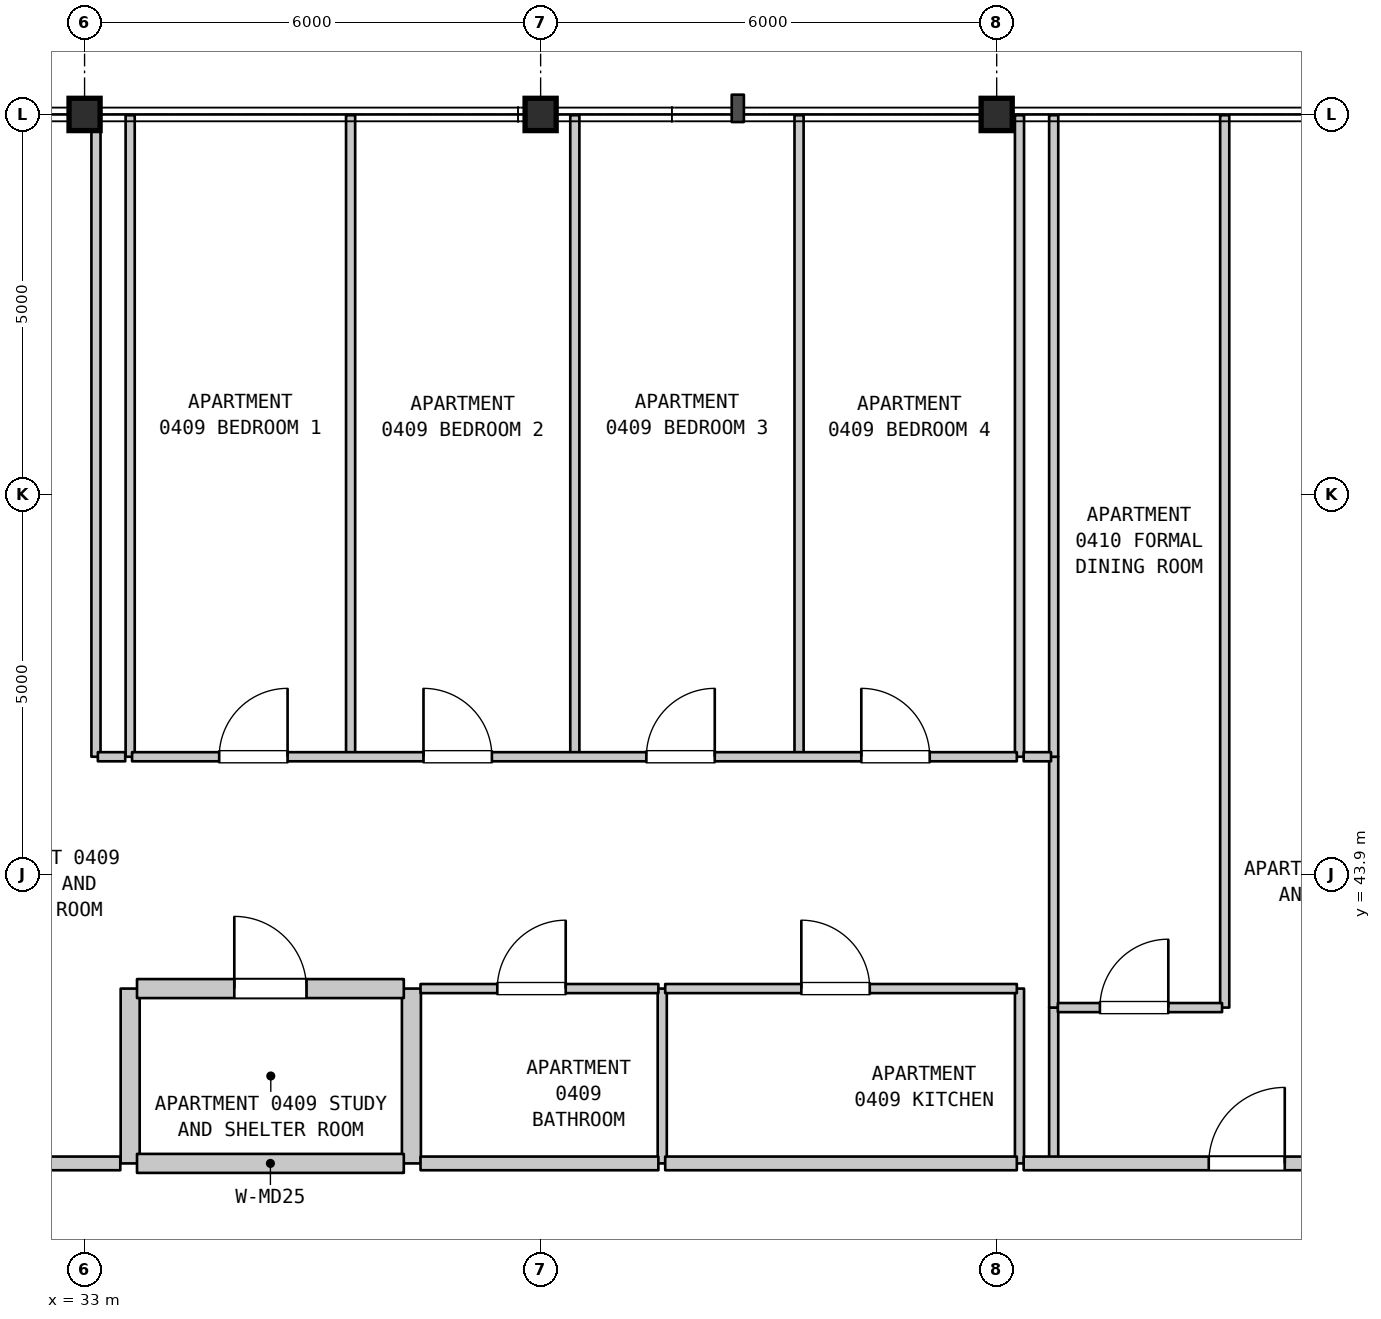
"""IFC4 building model, lengths in metres.
Left out: names, types, materials, properties, quantities, classifications, styles, units other than length and angle.
Written with IfcOpenShell. Run it as: python <this file> out.ifc"""

import sys

from ifc_helpers import new_model, si_unit, direction, frame, frame_2d, origin, origin_2d, place, context, subcontext, project, spatial, rectangle, i_section, extrude, element, fill, save


model = new_model("IFC4")
c1 = context("Model", 3, precision=1e-05, world=origin(), true_north=direction((0.0, 1.0)))
c2 = subcontext(c1, "Body", "Model", "MODEL_VIEW")
j1 = project(units=[si_unit("LENGTHUNIT", "METRE"), si_unit("PLANEANGLEUNIT", "RADIAN")], contexts=[c1])
p1 = place(None, origin())
s1 = spatial("IfcSite", under=j1, at=p1, CompositionType="ELEMENT")
p2 = place(p1, origin())
s2 = spatial("IfcBuilding", under=s1, at=p2, CompositionType="ELEMENT")
p3 = place(p2, frame((0.0, 0.0, 24.0)))
s3 = spatial("IfcBuildingStorey", under=s2, at=p3, CompositionType="ELEMENT", Elevation=24.0)
for number, where, z_axis, x_axis in (
    (1, (33.0, 53.9, 0.0), (0.0, 0.0, 1.0), (1.0, 0.0, 0.0)),
    (2, (39.0, 53.9, 0.0), (0.0, 0.0, 1.0), (1.0, 0.0, 0.0)),
    (3, (45.0, 53.9, 0.0), (0.0, 0.0, 1.0), (1.0, 0.0, 0.0)),
):
    element("IfcColumn", number, at=place(p3, frame(where, z_axis=z_axis, x_axis=x_axis)), inside=s3, PredefinedType="COLUMN", context=c2, shape_type="SweptSolid", body=[
        extrude(i_section(OverallWidth=0.409, OverallDepth=0.425, WebThickness=0.032, FlangeThickness=0.052, FilletRadius=0.015, at=origin_2d()), origin(), (0.0, 0.0, 1.0), 3.7),
    ])
p4 = place(p3, frame((33.15, 45.45, 0.0), z_axis=(0.0, 0.0, 1.0), x_axis=(0.0, 1.0, 0.0)))
e4 = element("IfcWall", 4, at=p4, inside=s3, PredefinedType="PARTITIONING", context=c2, shape_type="SweptSolid", body=[
    extrude(rectangle(XDim=8.44, YDim=0.12, at=frame_2d((4.22, 0.0))), origin(), (0.0, 0.0, 1.0), 2.785),
])
p5 = place(p3, frame((33.6, 40.1, 0.0), z_axis=(0.0, 0.0, 1.0), x_axis=(0.0, 1.0, 0.0)))
e5 = element("IfcWall", 5, at=p5, inside=s3, PredefinedType="STANDARD", context=c2, shape_type="SweptSolid", body=[
    extrude(rectangle(XDim=2.3, YDim=0.25, at=frame_2d((1.15, 0.0))), origin(), (0.0, 0.0, 1.0), 3.385),
])
for number, where, z_axis, x_axis in (
    (6, (33.6, 45.45, 0.0), (0.0, 0.0, 1.0), (0.0, 1.0, 0.0)),
    (7, (36.5, 45.45, 0.0), (0.0, 0.0, 1.0), (0.0, 1.0, 0.0)),
):
    element("IfcWall", number, at=place(p3, frame(where, z_axis=z_axis, x_axis=x_axis)), inside=s3, PredefinedType="PARTITIONING", context=c2, shape_type="SweptSolid", body=[
        extrude(rectangle(XDim=8.44, YDim=0.12, at=frame_2d((4.22, 0.0))), origin(), (0.0, 0.0, 1.0), 3.385),
    ])
p6 = place(p3, frame((37.3, 40.1, 0.0), z_axis=(0.0, 0.0, 1.0), x_axis=(0.0, 1.0, 0.0)))
e8 = element("IfcWall", 8, at=p6, inside=s3, PredefinedType="STANDARD", context=c2, shape_type="SweptSolid", body=[
    extrude(rectangle(XDim=2.3, YDim=0.25, at=frame_2d((1.15, 0.0))), origin(), (0.0, 0.0, 1.0), 3.385),
])
p7 = place(p3, frame((39.45, 45.45, 0.0), z_axis=(0.0, 0.0, 1.0), x_axis=(0.0, 1.0, 0.0)))
e9 = element("IfcWall", 9, at=p7, inside=s3, PredefinedType="PARTITIONING", context=c2, shape_type="SweptSolid", body=[
    extrude(rectangle(XDim=8.44, YDim=0.12, at=frame_2d((4.22, 0.0))), origin(), (0.0, 0.0, 1.0), 3.385),
])
p8 = place(p3, frame((40.6, 40.1, 0.0), z_axis=(0.0, 0.0, 1.0), x_axis=(0.0, 1.0, 0.0)))
e10 = element("IfcWall", 10, at=p8, inside=s3, PredefinedType="PARTITIONING", context=c2, shape_type="SweptSolid", body=[
    extrude(rectangle(XDim=2.3, YDim=0.12, at=frame_2d((1.15, 0.0))), origin(), (0.0, 0.0, 1.0), 3.385),
])
p9 = place(p3, frame((42.4, 45.45, 0.0), z_axis=(0.0, 0.0, 1.0), x_axis=(0.0, 1.0, 0.0)))
e11 = element("IfcWall", 11, at=p9, inside=s3, PredefinedType="PARTITIONING", context=c2, shape_type="SweptSolid", body=[
    extrude(rectangle(XDim=8.44, YDim=0.12, at=frame_2d((4.22, 0.0))), origin(), (0.0, 0.0, 1.0), 3.385),
])
p10 = place(p3, frame((45.3, 40.1, 0.0), z_axis=(0.0, 0.0, 1.0), x_axis=(0.0, 1.0, 0.0)))
e12 = element("IfcWall", 12, at=p10, inside=s3, PredefinedType="PARTITIONING", context=c2, shape_type="SweptSolid", body=[
    extrude(rectangle(XDim=2.3, YDim=0.12, at=frame_2d((1.15, 0.0))), origin(), (0.0, 0.0, 1.0), 3.385),
])
p11 = place(p3, frame((45.3, 45.45, 0.0), z_axis=(0.0, 0.0, 1.0), x_axis=(0.0, 1.0, 0.0)))
e13 = element("IfcWall", 13, at=p11, inside=s3, PredefinedType="PARTITIONING", context=c2, shape_type="SweptSolid", body=[
    extrude(rectangle(XDim=8.44, YDim=0.12, at=frame_2d((4.22, 0.0))), origin(), (0.0, 0.0, 1.0), 3.385),
])
p12 = place(p3, frame((45.75, 40.1, 0.0), z_axis=(0.0, 0.0, 1.0), x_axis=(0.0, 1.0, 0.0)))
e14 = element("IfcWall", 14, at=p12, inside=s3, PredefinedType="PARTITIONING", context=c2, shape_type="SweptSolid", body=[
    extrude(rectangle(XDim=2.05, YDim=0.12, at=frame_2d((1.025, 0.0))), origin(), (0.0, 0.0, 1.0), 3.385),
])
p13 = place(p3, frame((45.75, 42.15, 0.0), z_axis=(0.0, 0.0, 1.0), x_axis=(0.0, 1.0, 0.0)))
e15 = element("IfcWall", 15, at=p13, inside=s3, PredefinedType="PARTITIONING", context=c2, shape_type="SweptSolid", body=[
    extrude(rectangle(XDim=3.3, YDim=0.12, at=frame_2d((1.65, 0.0))), origin(), (0.0, 0.0, 1.0), 3.385),
])
p14 = place(p3, frame((45.75, 45.45, 0.0), z_axis=(0.0, 0.0, 1.0), x_axis=(0.0, 1.0, 0.0)))
e16 = element("IfcWall", 16, at=p14, inside=s3, PredefinedType="PARTITIONING", context=c2, shape_type="SweptSolid", body=[
    extrude(rectangle(XDim=8.44, YDim=0.12, at=frame_2d((4.22, 0.0))), origin(), (0.0, 0.0, 1.0), 3.385),
])
p15 = place(p3, frame((48.0, 42.15, 0.0), z_axis=(0.0, 0.0, 1.0), x_axis=(0.0, 1.0, 0.0)))
e17 = element("IfcWall", 17, at=p15, inside=s3, PredefinedType="PARTITIONING", context=c2, shape_type="SweptSolid", body=[
    extrude(rectangle(XDim=11.74, YDim=0.12, at=frame_2d((5.87, 0.0))), origin(), (0.0, 0.0, 1.0), 3.385),
])
p16 = place(p3, frame((28.375, 40.1, 0.0), z_axis=(0.0, 0.0, 1.0), x_axis=(1.0, 0.0, 0.0)))
e18 = element("IfcWall", 18, at=p16, inside=s3, PredefinedType="STANDARD", context=c2, shape_type="SweptSolid", body=[
    extrude(rectangle(XDim=5.095, YDim=0.18, at=frame_2d((2.547, 0.0))), origin(), (0.0, 0.0, 1.0), 3.385),
])
p17 = place(p16, frame((2.08, 0.0, 0.0)))
e19 = element("IfcOpeningElement", 19, at=p17, cuts=e18, PredefinedType="OPENING", context=c2, shape_type="SweptSolid", body=[
    extrude(rectangle(XDim=1.0, YDim=2.15, at=frame_2d((0.5, 1.075))), frame((0.0, 0.1, 0.0), z_axis=(0.0, -1.0, 0.0), x_axis=(1.0, 0.0, 0.0)), (0.0, 0.0, 1.0), 0.2),
])
p18 = place(p3, frame((33.69, 40.1, 0.0), z_axis=(0.0, 0.0, 1.0), x_axis=(1.0, 0.0, 0.0)))
e20 = element("IfcWall", 20, at=p18, inside=s3, PredefinedType="STANDARD", context=c2, shape_type="SweptSolid", body=[
    extrude(rectangle(XDim=3.51, YDim=0.25, at=frame_2d((1.755, 0.0))), origin(), (0.0, 0.0, 1.0), 3.385),
])
p19 = place(p3, frame((37.42, 40.1, 0.0), z_axis=(0.0, 0.0, 1.0), x_axis=(1.0, 0.0, 0.0)))
e21 = element("IfcWall", 21, at=p19, inside=s3, PredefinedType="STANDARD", context=c2, shape_type="SweptSolid", body=[
    extrude(rectangle(XDim=3.129, YDim=0.18, at=frame_2d((1.564, 0.0))), origin(), (0.0, 0.0, 1.0), 3.385),
])
p20 = place(p3, frame((40.639, 40.1, 0.0), z_axis=(0.0, 0.0, 1.0), x_axis=(1.0, 0.0, 0.0)))
e22 = element("IfcWall", 22, at=p20, inside=s3, PredefinedType="STANDARD", context=c2, shape_type="SweptSolid", body=[
    extrude(rectangle(XDim=4.626, YDim=0.18, at=frame_2d((2.313, 0.0))), origin(), (0.0, 0.0, 1.0), 3.385),
])
p21 = place(p3, frame((45.355, 40.1, 0.0), z_axis=(0.0, 0.0, 1.0), x_axis=(1.0, 0.0, 0.0)))
e23 = element("IfcWall", 23, at=p21, inside=s3, PredefinedType="STANDARD", context=c2, shape_type="SweptSolid", body=[
    extrude(rectangle(XDim=5.61, YDim=0.18, at=frame_2d((2.805, 0.0))), origin(), (0.0, 0.0, 1.0), 3.385),
])
p22 = place(p21, frame((2.435, 0.0, 0.0)))
e24 = element("IfcOpeningElement", 24, at=p22, cuts=e23, PredefinedType="OPENING", context=c2, shape_type="SweptSolid", body=[
    extrude(rectangle(XDim=1.0, YDim=2.15, at=frame_2d((0.5, 1.075))), frame((0.0, 0.1, 0.0), z_axis=(0.0, -1.0, 0.0), x_axis=(1.0, 0.0, 0.0)), (0.0, 0.0, 1.0), 0.2),
])
p23 = place(p3, frame((45.805, 42.15, 0.0), z_axis=(0.0, 0.0, 1.0), x_axis=(1.0, 0.0, 0.0)))
e25 = element("IfcWall", 25, at=p23, inside=s3, PredefinedType="PARTITIONING", context=c2, shape_type="SweptSolid", body=[
    extrude(rectangle(XDim=2.16, YDim=0.12, at=frame_2d((1.08, 0.0))), origin(), (0.0, 0.0, 1.0), 3.385),
])
p24 = place(p23, frame((0.553, 0.0, 0.0)))
e26 = element("IfcOpeningElement", 26, at=p24, cuts=e25, PredefinedType="OPENING", context=c2, shape_type="SweptSolid", body=[
    extrude(rectangle(XDim=0.9, YDim=2.15, at=frame_2d((0.45, 1.075))), frame((0.0, 0.07, 0.0), z_axis=(0.0, -1.0, 0.0), x_axis=(1.0, 0.0, 0.0)), (0.0, 0.0, 1.0), 0.14),
])
p25 = place(p3, frame((33.69, 42.4, 0.0), z_axis=(0.0, 0.0, 1.0), x_axis=(1.0, 0.0, 0.0)))
e27 = element("IfcWall", 27, at=p25, inside=s3, PredefinedType="STANDARD", context=c2, shape_type="SweptSolid", body=[
    extrude(rectangle(XDim=3.51, YDim=0.25, at=frame_2d((1.755, 0.0))), origin(), (0.0, 0.0, 1.0), 3.385),
])
p26 = place(p25, frame((1.28, 0.0, 0.0)))
e28 = element("IfcOpeningElement", 28, at=p26, cuts=e27, PredefinedType="OPENING", context=c2, shape_type="SweptSolid", body=[
    extrude(rectangle(XDim=0.95, YDim=2.15, at=frame_2d((0.475, 1.075))), frame((0.0, 0.135, 0.0), z_axis=(0.0, -1.0, 0.0), x_axis=(1.0, 0.0, 0.0)), (0.0, 0.0, 1.0), 0.27),
])
p27 = place(p3, frame((37.42, 42.4, 0.0), z_axis=(0.0, 0.0, 1.0), x_axis=(1.0, 0.0, 0.0)))
e29 = element("IfcWall", 29, at=p27, inside=s3, PredefinedType="PARTITIONING", context=c2, shape_type="SweptSolid", body=[
    extrude(rectangle(XDim=3.129, YDim=0.12, at=frame_2d((1.564, 0.0))), origin(), (0.0, 0.0, 1.0), 3.385),
])
p28 = place(p27, frame((1.01, 0.0, 0.0)))
e30 = element("IfcOpeningElement", 30, at=p28, cuts=e29, PredefinedType="OPENING", context=c2, shape_type="SweptSolid", body=[
    extrude(rectangle(XDim=0.9, YDim=2.1, at=frame_2d((0.45, 1.05))), frame((0.0, 0.07, 0.0), z_axis=(0.0, -1.0, 0.0), x_axis=(1.0, 0.0, 0.0)), (0.0, 0.0, 1.0), 0.14),
])
p29 = place(p3, frame((40.639, 42.4, 0.0), z_axis=(0.0, 0.0, 1.0), x_axis=(1.0, 0.0, 0.0)))
e31 = element("IfcWall", 31, at=p29, inside=s3, PredefinedType="PARTITIONING", context=c2, shape_type="SweptSolid", body=[
    extrude(rectangle(XDim=4.626, YDim=0.12, at=frame_2d((2.313, 0.0))), origin(), (0.0, 0.0, 1.0), 3.385),
])
p30 = place(p29, frame((1.791, 0.0, 0.0)))
e32 = element("IfcOpeningElement", 32, at=p30, cuts=e31, PredefinedType="OPENING", context=c2, shape_type="SweptSolid", body=[
    extrude(rectangle(XDim=0.9, YDim=2.15, at=frame_2d((0.45, 1.075))), frame((0.0, 0.07, 0.0), z_axis=(0.0, -1.0, 0.0), x_axis=(1.0, 0.0, 0.0)), (0.0, 0.0, 1.0), 0.14),
])
p31 = place(p3, frame((33.175, 45.45, 0.0), z_axis=(0.0, 0.0, 1.0), x_axis=(1.0, 0.0, 0.0)))
e33 = element("IfcWall", 33, at=p31, inside=s3, PredefinedType="PARTITIONING", context=c2, shape_type="SweptSolid", body=[
    extrude(rectangle(XDim=0.36, YDim=0.12, at=frame_2d((0.18, 0.0))), origin(), (0.0, 0.0, 1.0), 3.385),
])
p32 = place(p3, frame((33.625, 45.45, 0.0), z_axis=(0.0, 0.0, 1.0), x_axis=(1.0, 0.0, 0.0)))
e34 = element("IfcWall", 34, at=p32, inside=s3, PredefinedType="PARTITIONING", context=c2, shape_type="SweptSolid", body=[
    extrude(rectangle(XDim=11.64, YDim=0.12, at=frame_2d((5.82, 0.0))), origin(), (0.0, 0.0, 1.0), 3.385),
])
p33 = place(p32, frame((1.146, 0.0, 0.0)))
e35 = element("IfcOpeningElement", 35, at=p33, cuts=e34, PredefinedType="OPENING", context=c2, shape_type="SweptSolid", body=[
    extrude(rectangle(XDim=0.9, YDim=2.15, at=frame_2d((0.45, 1.075))), frame((0.0, 0.07, 0.0), z_axis=(0.0, -1.0, 0.0), x_axis=(1.0, 0.0, 0.0)), (0.0, 0.0, 1.0), 0.14),
])
p34 = place(p32, frame((3.834, 0.0, 0.0)))
e36 = element("IfcOpeningElement", 36, at=p34, cuts=e34, PredefinedType="OPENING", context=c2, shape_type="SweptSolid", body=[
    extrude(rectangle(XDim=0.9, YDim=2.15, at=frame_2d((0.45, 1.075))), frame((0.0, 0.07, 0.0), z_axis=(0.0, -1.0, 0.0), x_axis=(1.0, 0.0, 0.0)), (0.0, 0.0, 1.0), 0.14),
])
p35 = place(p32, frame((6.766, 0.0, 0.0)))
e37 = element("IfcOpeningElement", 37, at=p35, cuts=e34, PredefinedType="OPENING", context=c2, shape_type="SweptSolid", body=[
    extrude(rectangle(XDim=0.9, YDim=2.15, at=frame_2d((0.45, 1.075))), frame((0.0, 0.07, 0.0), z_axis=(0.0, -1.0, 0.0), x_axis=(1.0, 0.0, 0.0)), (0.0, 0.0, 1.0), 0.14),
])
p36 = place(p32, frame((9.594, 0.0, 0.0)))
e38 = element("IfcOpeningElement", 38, at=p36, cuts=e34, PredefinedType="OPENING", context=c2, shape_type="SweptSolid", body=[
    extrude(rectangle(XDim=0.9, YDim=2.15, at=frame_2d((0.45, 1.075))), frame((0.0, 0.07, 0.0), z_axis=(0.0, -1.0, 0.0), x_axis=(1.0, 0.0, 0.0)), (0.0, 0.0, 1.0), 0.14),
])
p37 = place(p3, frame((45.355, 45.45, 0.0), z_axis=(0.0, 0.0, 1.0), x_axis=(1.0, 0.0, 0.0)))
e39 = element("IfcWall", 39, at=p37, inside=s3, PredefinedType="PARTITIONING", context=c2, shape_type="SweptSolid", body=[
    extrude(rectangle(XDim=0.36, YDim=0.12, at=frame_2d((0.18, 0.0))), origin(), (0.0, 0.0, 1.0), 3.385),
])
p38 = place(p22, origin())
e40 = element("IfcDoor", 40, at=p38, inside=s3, OperationType="SINGLE_SWING_RIGHT", PredefinedType="DOOR", context=c2, shape_type="SweptSolid", body=[
    extrude(rectangle(XDim=1.0, YDim=2.15, at=frame_2d((0.5, 1.075))), frame((0.0, 0.025, 0.0), z_axis=(0.0, -1.0, 0.0), x_axis=(1.0, 0.0, 0.0)), (0.0, 0.0, 1.0), 0.05),
])
fill(e24, e40)
p39 = place(p24, origin())
e41 = element("IfcDoor", 41, at=p39, inside=s3, OperationType="SINGLE_SWING_RIGHT", PredefinedType="DOOR", context=c2, shape_type="SweptSolid", body=[
    extrude(rectangle(XDim=0.9, YDim=2.15, at=frame_2d((0.45, 1.075))), frame((0.0, 0.025, 0.0), z_axis=(0.0, -1.0, 0.0), x_axis=(1.0, 0.0, 0.0)), (0.0, 0.0, 1.0), 0.05),
])
fill(e26, e41)
p40 = place(p26, origin())
e42 = element("IfcDoor", 42, at=p40, inside=s3, OperationType="SINGLE_SWING_LEFT", PredefinedType="DOOR", context=c2, shape_type="SweptSolid", body=[
    extrude(rectangle(XDim=0.95, YDim=2.15, at=frame_2d((0.475, 1.075))), frame((0.0, 0.025, 0.0), z_axis=(0.0, -1.0, 0.0), x_axis=(1.0, 0.0, 0.0)), (0.0, 0.0, 1.0), 0.05),
])
fill(e28, e42)
p41 = place(p28, origin())
e43 = element("IfcDoor", 43, at=p41, inside=s3, OperationType="SINGLE_SWING_RIGHT", PredefinedType="DOOR", context=c2, shape_type="SweptSolid", body=[
    extrude(rectangle(XDim=0.9, YDim=2.1, at=frame_2d((0.45, 1.05))), frame((0.0, 0.025, 0.0), z_axis=(0.0, -1.0, 0.0), x_axis=(1.0, 0.0, 0.0)), (0.0, 0.0, 1.0), 0.05),
])
fill(e30, e43)
p42 = place(p30, origin())
e44 = element("IfcDoor", 44, at=p42, inside=s3, OperationType="SINGLE_SWING_LEFT", PredefinedType="DOOR", context=c2, shape_type="SweptSolid", body=[
    extrude(rectangle(XDim=0.9, YDim=2.15, at=frame_2d((0.45, 1.075))), frame((0.0, 0.025, 0.0), z_axis=(0.0, -1.0, 0.0), x_axis=(1.0, 0.0, 0.0)), (0.0, 0.0, 1.0), 0.05),
])
fill(e32, e44)
p43 = place(p33, origin())
e45 = element("IfcDoor", 45, at=p43, inside=s3, OperationType="SINGLE_SWING_RIGHT", PredefinedType="DOOR", context=c2, shape_type="SweptSolid", body=[
    extrude(rectangle(XDim=0.9, YDim=2.15, at=frame_2d((0.45, 1.075))), frame((0.0, 0.025, 0.0), z_axis=(0.0, -1.0, 0.0), x_axis=(1.0, 0.0, 0.0)), (0.0, 0.0, 1.0), 0.05),
])
fill(e35, e45)
p44 = place(p34, origin())
e46 = element("IfcDoor", 46, at=p44, inside=s3, OperationType="SINGLE_SWING_LEFT", PredefinedType="DOOR", context=c2, shape_type="SweptSolid", body=[
    extrude(rectangle(XDim=0.9, YDim=2.15, at=frame_2d((0.45, 1.075))), frame((0.0, 0.025, 0.0), z_axis=(0.0, -1.0, 0.0), x_axis=(1.0, 0.0, 0.0)), (0.0, 0.0, 1.0), 0.05),
])
fill(e36, e46)
p45 = place(p35, origin())
e47 = element("IfcDoor", 47, at=p45, inside=s3, OperationType="SINGLE_SWING_RIGHT", PredefinedType="DOOR", context=c2, shape_type="SweptSolid", body=[
    extrude(rectangle(XDim=0.9, YDim=2.15, at=frame_2d((0.45, 1.075))), frame((0.0, 0.025, 0.0), z_axis=(0.0, -1.0, 0.0), x_axis=(1.0, 0.0, 0.0)), (0.0, 0.0, 1.0), 0.05),
])
fill(e37, e47)
p46 = place(p36, origin())
e48 = element("IfcDoor", 48, at=p46, inside=s3, OperationType="SINGLE_SWING_LEFT", PredefinedType="DOOR", context=c2, shape_type="SweptSolid", body=[
    extrude(rectangle(XDim=0.9, YDim=2.15, at=frame_2d((0.45, 1.075))), frame((0.0, 0.025, 0.0), z_axis=(0.0, -1.0, 0.0), x_axis=(1.0, 0.0, 0.0)), (0.0, 0.0, 1.0), 0.05),
])
fill(e38, e48)
save(model, sys.argv[1])
